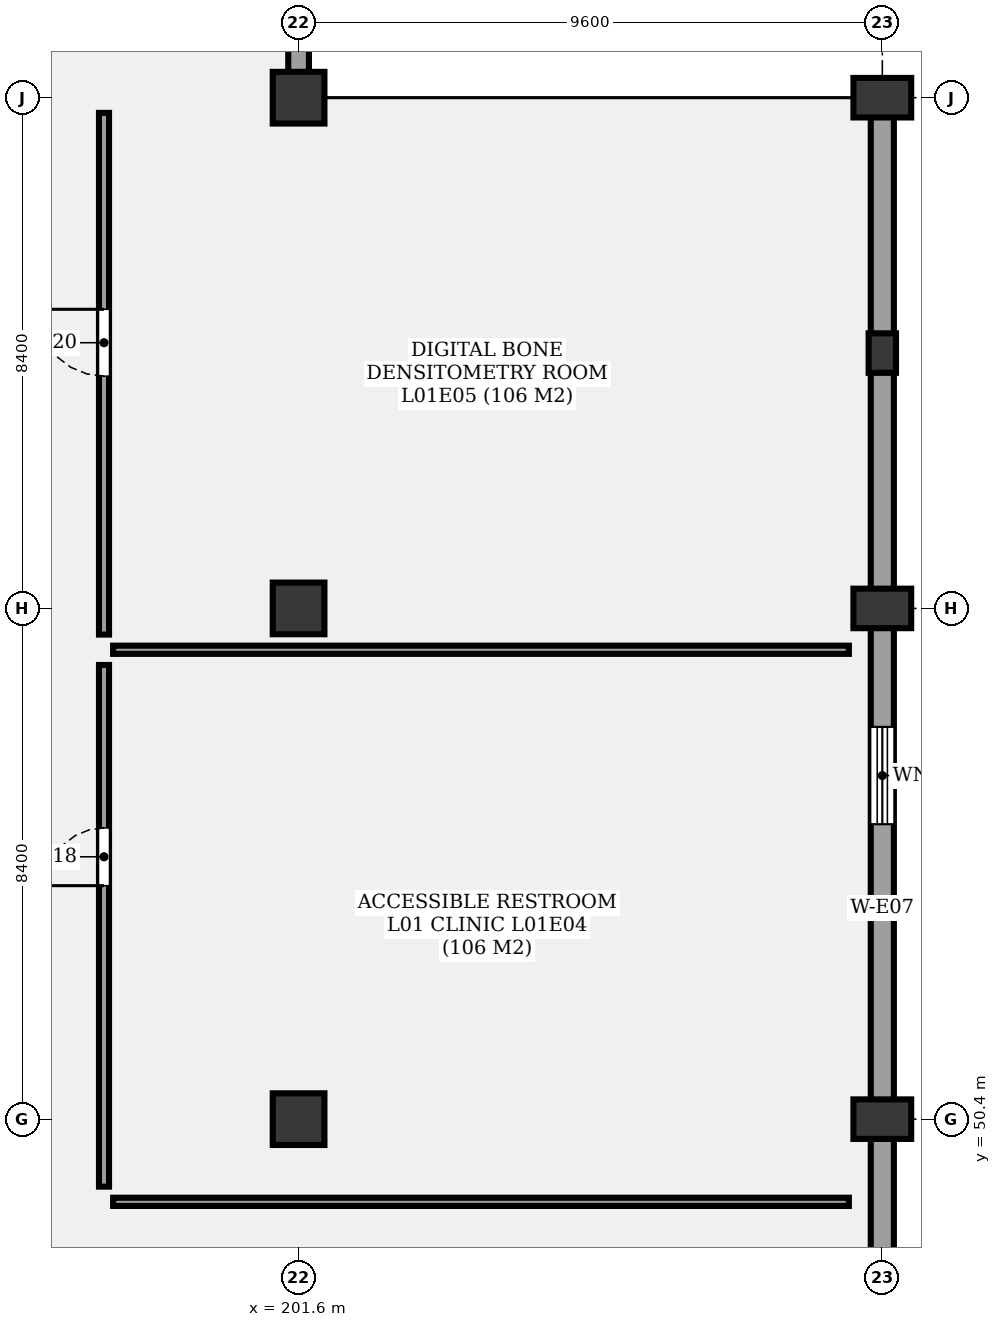
"""IFC4 building model, lengths in metres.
Left out: names, types, materials, properties, quantities, classifications, styles, units other than length and angle.
Written with IfcOpenShell. Run it as: python <this file> out.ifc"""

import sys

from ifc_helpers import new_model, si_unit, direction, frame, frame_2d, origin, origin_2d, place, context, subcontext, project, spatial, rectangle, extrude, element, fill, save


model = new_model("IFC4")
c1 = context("Model", 3, precision=1e-05, world=origin(), true_north=direction((0.0, 1.0)))
c2 = subcontext(c1, "Body", "Model", "MODEL_VIEW")
j1 = project(units=[si_unit("LENGTHUNIT", "METRE"), si_unit("PLANEANGLEUNIT", "RADIAN")], contexts=[c1])
p1 = place(None, origin())
s1 = spatial("IfcSite", under=j1, at=p1, CompositionType="ELEMENT")
p2 = place(p1, origin())
s2 = spatial("IfcBuilding", under=s1, at=p2, CompositionType="ELEMENT")
p3 = place(p2, frame((0.0, 0.0, 5.1)))
s3 = spatial("IfcBuildingStorey", under=s2, at=p3, CompositionType="ELEMENT", Elevation=5.1)
for number, where, z_axis, x_axis in (
    (1, (201.6, 50.4, 0.0), (0.0, 0.0, 1.0), (1.0, 0.0, 0.0)),
    (2, (201.6, 58.8, 0.0), (0.0, 0.0, 1.0), (1.0, 0.0, 0.0)),
    (3, (201.6, 67.2, 0.0), (0.0, 0.0, 1.0), (1.0, 0.0, 0.0)),
):
    element("IfcColumn", number, at=place(p3, frame(where, z_axis=z_axis, x_axis=x_axis)), inside=s3, PredefinedType="COLUMN", context=c2, shape_type="SweptSolid", body=[
        extrude(rectangle(XDim=0.85, YDim=0.85, at=origin_2d()), origin(), (0.0, 0.0, 1.0), 4.8),
    ])
for number, where, z_axis, x_axis in (
    (4, (211.2, 50.4, 0.0), (0.0, 0.0, 1.0), (0.0, 1.0, 0.0)),
    (5, (211.2, 58.8, 0.0), (0.0, 0.0, 1.0), (0.0, 1.0, 0.0)),
    (6, (211.2, 67.2, 0.0), (0.0, 0.0, 1.0), (0.0, 1.0, 0.0)),
):
    element("IfcColumn", number, at=place(p3, frame(where, z_axis=z_axis, x_axis=x_axis)), inside=s3, PredefinedType="COLUMN", context=c2, shape_type="SweptSolid", body=[
        extrude(rectangle(XDim=0.95, YDim=0.65, at=origin_2d()), origin(), (0.0, 0.0, 1.0), 4.8),
    ])
p4 = place(p3, frame((211.2, 63.0, 0.0), z_axis=(0.0, 0.0, 1.0), x_axis=(1.0, 0.0, 0.0)))
e7 = element("IfcColumn", 7, at=p4, inside=s3, PredefinedType="PILASTER", context=c2, shape_type="SweptSolid", body=[
    extrude(rectangle(XDim=0.45, YDim=0.65, at=origin_2d()), origin(), (0.0, 0.0, 1.0), 4.8),
])
p5 = place(p3, frame((201.6, 75.44, 0.0), z_axis=(0.0, 0.0, 1.0), x_axis=(0.0, -1.0, 0.0)))
e8 = element("IfcWall", 8, at=p5, inside=s3, PredefinedType="SOLIDWALL", context=c2, shape_type="SweptSolid", body=[
    extrude(rectangle(XDim=8.08, YDim=0.34, at=frame_2d((4.04, 0.0))), origin(), (0.0, 0.0, 1.0), 3.94),
])
p6 = place(p5, frame((3.39, 0.0, 0.85)))
e9 = element("IfcOpeningElement", 9, at=p6, cuts=e8, PredefinedType="OPENING", context=c2, shape_type="SweptSolid", body=[
    extrude(rectangle(XDim=1.3, YDim=1.2, at=frame_2d((0.65, 0.6))), frame((0.0, 0.18, 0.0), z_axis=(0.0, -1.0, 0.0), x_axis=(1.0, 0.0, 0.0)), (0.0, 0.0, 1.0), 0.36),
])
p7 = place(p3, frame((211.2, 67.04, 0.0), z_axis=(0.0, 0.0, 1.0), x_axis=(0.0, -1.0, 0.0)))
e10 = element("IfcWall", 10, at=p7, inside=s3, PredefinedType="SOLIDWALL", context=c2, shape_type="SweptSolid", body=[
    extrude(rectangle(XDim=33.44, YDim=0.38, at=frame_2d((16.72, 0.0))), origin(), (0.0, 0.0, 1.0), 3.94),
])
p8 = place(p7, frame((10.189, 0.0, 0.85)))
e11 = element("IfcOpeningElement", 11, at=p8, cuts=e10, PredefinedType="OPENING", context=c2, shape_type="SweptSolid", body=[
    extrude(rectangle(XDim=1.6, YDim=1.2, at=frame_2d((0.8, 0.6))), frame((0.0, 0.2, 0.0), z_axis=(0.0, -1.0, 0.0), x_axis=(1.0, 0.0, 0.0)), (0.0, 0.0, 1.0), 0.4),
])
p9 = place(p3, frame((198.4, 49.29, 0.0), z_axis=(0.0, 0.0, 1.0), x_axis=(0.0, 1.0, 0.0)))
e12 = element("IfcWall", 12, at=p9, inside=s3, PredefinedType="PARTITIONING", context=c2, shape_type="SweptSolid", body=[
    extrude(rectangle(XDim=8.58, YDim=0.165, at=frame_2d((4.29, 0.0))), origin(), (0.0, 0.0, 1.0), 3.68),
])
p10 = place(p9, frame((4.95, 0.0, 0.0)))
e13 = element("IfcOpeningElement", 13, at=p10, cuts=e12, PredefinedType="OPENING", context=c2, shape_type="SweptSolid", body=[
    extrude(rectangle(XDim=0.95, YDim=2.1, at=frame_2d((0.475, 1.05))), frame((0.0, 0.093, 0.0), z_axis=(0.0, -1.0, 0.0), x_axis=(1.0, 0.0, 0.0)), (0.0, 0.0, 1.0), 0.185),
])
p11 = place(p3, frame((198.55, 49.04, 0.0), z_axis=(0.0, 0.0, 1.0), x_axis=(1.0, 0.0, 0.0)))
e14 = element("IfcWall", 14, at=p11, inside=s3, PredefinedType="PARTITIONING", context=c2, shape_type="SweptSolid", body=[
    extrude(rectangle(XDim=12.1, YDim=0.135, at=frame_2d((6.05, 0.0))), origin(), (0.0, 0.0, 1.0), 3.68),
])
p12 = place(p3, frame((198.4, 58.37, 0.0), z_axis=(0.0, 0.0, 1.0), x_axis=(0.0, 1.0, 0.0)))
e15 = element("IfcWall", 15, at=p12, inside=s3, PredefinedType="PARTITIONING", context=c2, shape_type="SweptSolid", body=[
    extrude(rectangle(XDim=8.58, YDim=0.165, at=frame_2d((4.29, 0.0))), origin(), (0.0, 0.0, 1.0), 3.68),
])
p13 = place(p12, frame((4.25, 0.0, 0.0)))
e16 = element("IfcOpeningElement", 16, at=p13, cuts=e15, PredefinedType="OPENING", context=c2, shape_type="SweptSolid", body=[
    extrude(rectangle(XDim=1.1, YDim=2.1, at=frame_2d((0.55, 1.05))), frame((0.0, 0.093, 0.0), z_axis=(0.0, -1.0, 0.0), x_axis=(1.0, 0.0, 0.0)), (0.0, 0.0, 1.0), 0.185),
])
p14 = place(p3, frame((198.55, 58.12, 0.0), z_axis=(0.0, 0.0, 1.0), x_axis=(1.0, 0.0, 0.0)))
e17 = element("IfcWall", 17, at=p14, inside=s3, PredefinedType="PARTITIONING", context=c2, shape_type="SweptSolid", body=[
    extrude(rectangle(XDim=12.1, YDim=0.135, at=frame_2d((6.05, 0.0))), origin(), (0.0, 0.0, 1.0), 3.68),
])
p15 = place(p8, origin())
e18 = element("IfcWindow", 18, at=p15, inside=s3, PartitioningType="SINGLE_PANEL", PredefinedType="WINDOW", context=c2, shape_type="SweptSolid", body=[
    extrude(rectangle(XDim=1.6, YDim=1.2, at=frame_2d((0.8, 0.6))), frame((0.0, 0.03, 0.0), z_axis=(0.0, -1.0, 0.0), x_axis=(1.0, 0.0, 0.0)), (0.0, 0.0, 1.0), 0.06),
])
fill(e11, e18)
p16 = place(p10, origin())
e19 = element("IfcDoor", 19, at=p16, inside=s3, OperationType="SINGLE_SWING_LEFT", PredefinedType="DOOR", context=c2, shape_type="SweptSolid", body=[
    extrude(rectangle(XDim=0.95, YDim=2.1, at=frame_2d((0.475, 1.05))), frame((0.0, 0.025, 0.0), z_axis=(0.0, -1.0, 0.0), x_axis=(1.0, 0.0, 0.0)), (0.0, 0.0, 1.0), 0.05),
])
fill(e13, e19)
p17 = place(p13, origin())
e20 = element("IfcDoor", 20, at=p17, inside=s3, OperationType="SINGLE_SWING_RIGHT", PredefinedType="DOOR", context=c2, shape_type="SweptSolid", body=[
    extrude(rectangle(XDim=1.1, YDim=2.1, at=frame_2d((0.55, 1.05))), frame((0.0, 0.025, 0.0), z_axis=(0.0, -1.0, 0.0), x_axis=(1.0, 0.0, 0.0)), (0.0, 0.0, 1.0), 0.05),
])
fill(e16, e20)
save(model, sys.argv[1])
